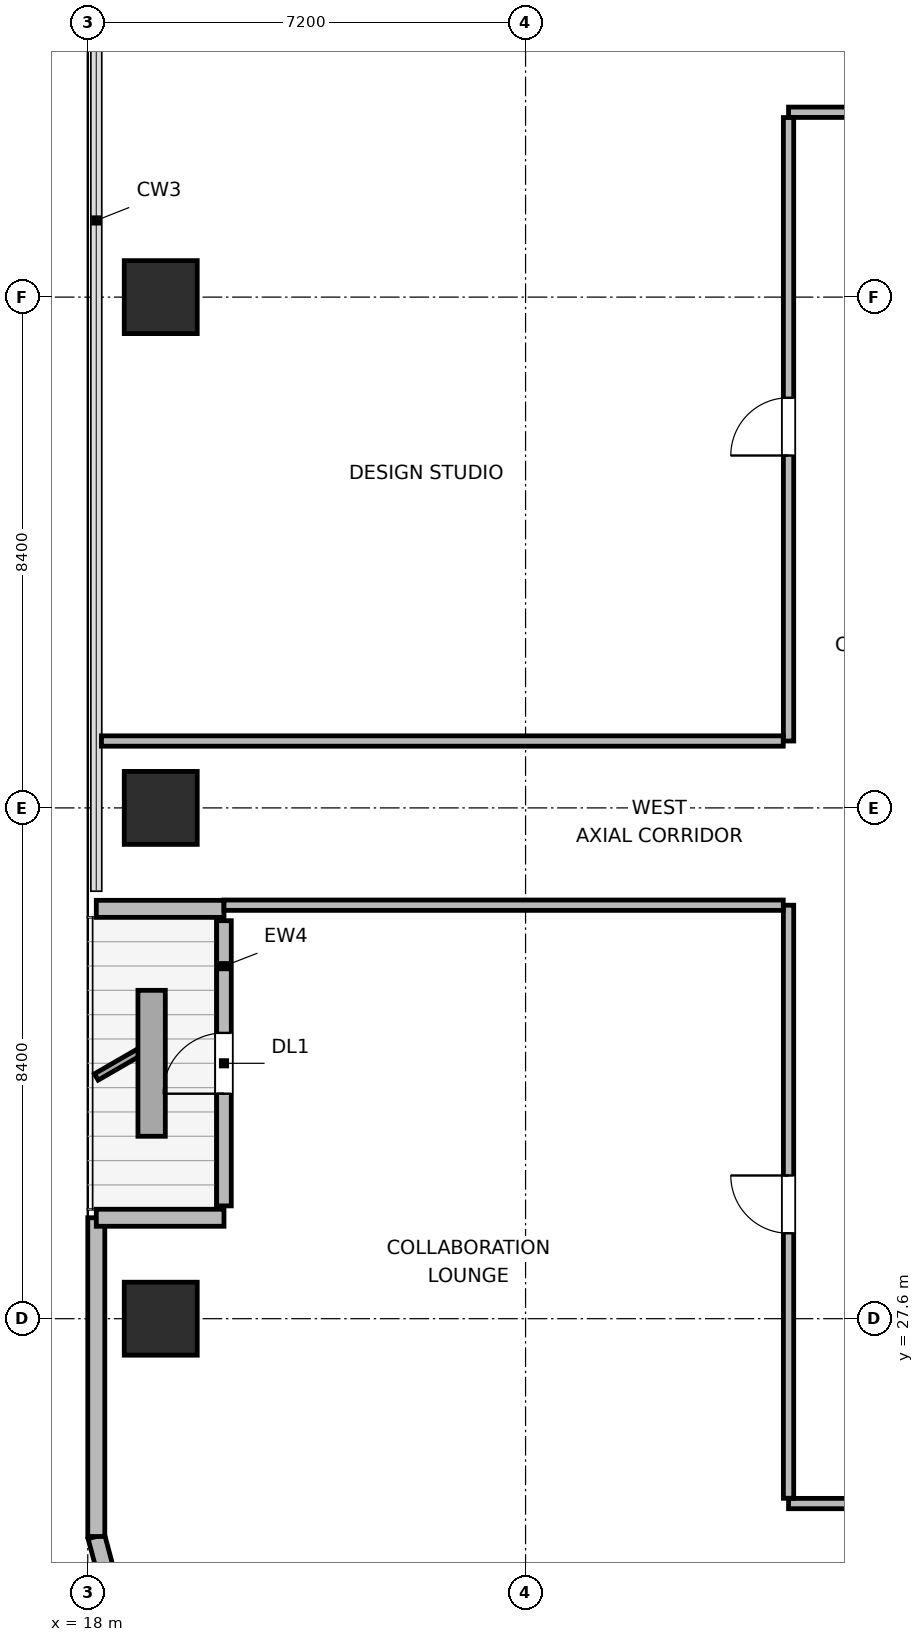
"""IFC4 building model, lengths in metres.
Left out: names, types, materials, properties, quantities, classifications, styles, units other than length and angle.
Written with IfcOpenShell. Run it as: python <this file> out.ifc"""

import sys

from ifc_helpers import new_model, si_unit, direction, frame, frame_2d, origin, origin_2d, place, context, subcontext, project, spatial, rectangle, extrude, element, fill, save


model = new_model("IFC4")
c1 = context("Model", 3, precision=1e-05, world=origin(), true_north=direction((0.0, 1.0)))
c2 = subcontext(c1, "Body", "Model", "MODEL_VIEW")
j1 = project(units=[si_unit("LENGTHUNIT", "METRE"), si_unit("PLANEANGLEUNIT", "RADIAN")], contexts=[c1])
p1 = place(None, origin())
s1 = spatial("IfcSite", under=j1, at=p1, CompositionType="ELEMENT")
p2 = place(p1, origin())
s2 = spatial("IfcBuilding", under=s1, at=p2, CompositionType="ELEMENT")
p3 = place(p2, frame((0.0, 0.0, 174.0)))
s3 = spatial("IfcBuildingStorey", under=s2, at=p3, CompositionType="ELEMENT", Elevation=174.0)
for number, where, z_axis, x_axis in (
    (1, (19.2, 27.6, 0.0), (0.0, 0.0, 1.0), (1.0, 0.0, 0.0)),
    (2, (19.2, 36.0, 0.0), (0.0, 0.0, 1.0), (1.0, 0.0, 0.0)),
    (3, (19.2, 44.4, 0.0), (0.0, 0.0, 1.0), (1.0, 0.0, 0.0)),
):
    element("IfcColumn", number, at=place(p3, frame(where, z_axis=z_axis, x_axis=x_axis)), inside=s3, PredefinedType="COLUMN", context=c2, shape_type="SweptSolid", body=[
        extrude(rectangle(XDim=1.2, YDim=1.2, at=origin_2d()), origin(), (0.0, 0.0, 1.0), 3.9),
    ])
p4 = place(p3, frame((18.848, 21.373, 0.0), z_axis=(0.0, 0.0, 1.0), x_axis=(-0.258672222976, 0.9659651552, 0.0)))
e4 = element("IfcWall", 4, at=p4, inside=s3, PredefinedType="SOLIDWALL", context=c2, shape_type="SweptSolid", body=[
    extrude(rectangle(XDim=2.739, YDim=0.28, at=frame_2d((1.37, 0.0))), origin(), (0.0, 0.0, 1.0), 3.68),
])
p5 = place(p3, frame((18.14, 24.018, 0.0), z_axis=(0.0, 0.0, 1.0), x_axis=(0.0, 1.0, 0.0)))
e5 = element("IfcWall", 5, at=p5, inside=s3, PredefinedType="SOLIDWALL", context=c2, shape_type="SweptSolid", body=[
    extrude(rectangle(XDim=5.242, YDim=0.28, at=frame_2d((2.621, 0.0))), origin(), (0.0, 0.0, 1.0), 3.68),
])
p6 = place(p3, frame((18.14, 29.26, 0.0), z_axis=(0.0, 0.0, 1.0), x_axis=(1.0, 0.0, 0.0)))
e6 = element("IfcWall", 6, at=p6, inside=s3, PredefinedType="SOLIDWALL", context=c2, shape_type="SweptSolid", body=[
    extrude(rectangle(XDim=2.1, YDim=0.28, at=frame_2d((1.05, 0.0))), origin(), (0.0, 0.0, 1.0), 3.116),
])
p7 = place(p3, frame((20.24, 29.455, 0.0), z_axis=(0.0, 0.0, 1.0), x_axis=(0.0, 1.0, 0.0)))
e7 = element("IfcWall", 7, at=p7, inside=s3, PredefinedType="SOLIDWALL", context=c2, shape_type="SweptSolid", body=[
    extrude(rectangle(XDim=4.69, YDim=0.24, at=frame_2d((2.345, 0.0))), origin(), (0.0, 0.0, 1.0), 3.248),
])
p8 = place(p7, frame((1.845, 0.0, 0.0)))
e8 = element("IfcOpeningElement", 8, at=p8, cuts=e7, PredefinedType="OPENING", context=c2, shape_type="SweptSolid", body=[
    extrude(rectangle(XDim=1.0, YDim=2.02, at=frame_2d((0.5, 1.01))), frame((0.0, 0.13, 0.0), z_axis=(0.0, -1.0, 0.0), x_axis=(1.0, 0.0, 0.0)), (0.0, 0.0, 1.0), 0.26),
])
p9 = place(p3, frame((20.24, 34.34, 0.0), z_axis=(0.0, 0.0, 1.0), x_axis=(-1.0, 0.0, 0.0)))
e9 = element("IfcWall", 9, at=p9, inside=s3, PredefinedType="SOLIDWALL", context=c2, shape_type="SweptSolid", body=[
    extrude(rectangle(XDim=2.1, YDim=0.28, at=frame_2d((1.05, 0.0))), origin(), (0.0, 0.0, 1.0), 3.116),
])
p10 = place(p3, frame((29.525, 24.56, 0.0), z_axis=(0.0, 0.0, 1.0), x_axis=(1.0, 0.0, 0.0)))
e10 = element("IfcWall", 10, at=p10, inside=s3, PredefinedType="PARTITIONING", context=c2, shape_type="SweptSolid", body=[
    extrude(rectangle(XDim=34.075, YDim=0.17, at=frame_2d((17.038, 0.0))), origin(), (0.0, 0.0, 1.0), 3.68),
])
p11 = place(p10, frame((5.403, 0.0, 0.0)))
e11 = element("IfcOpeningElement", 11, at=p11, cuts=e10, PredefinedType="OPENING", context=c2, shape_type="SweptSolid", body=[
    extrude(rectangle(XDim=0.95, YDim=2.04, at=frame_2d((0.475, 1.02))), frame((0.0, 0.095, 0.0), z_axis=(0.0, -1.0, 0.0), x_axis=(1.0, 0.0, 0.0)), (0.0, 0.0, 1.0), 0.19),
])
p12 = place(p10, frame((16.56, 0.0, 0.0)))
e12 = element("IfcOpeningElement", 12, at=p12, cuts=e10, PredefinedType="OPENING", context=c2, shape_type="SweptSolid", body=[
    extrude(rectangle(XDim=0.95, YDim=2.04, at=frame_2d((0.475, 1.02))), frame((0.0, 0.095, 0.0), z_axis=(0.0, -1.0, 0.0), x_axis=(1.0, 0.0, 0.0)), (0.0, 0.0, 1.0), 0.19),
])
p13 = place(p10, frame((27.72, 0.0, 0.0)))
e13 = element("IfcOpeningElement", 13, at=p13, cuts=e10, PredefinedType="OPENING", context=c2, shape_type="SweptSolid", body=[
    extrude(rectangle(XDim=0.95, YDim=2.04, at=frame_2d((0.475, 1.02))), frame((0.0, 0.095, 0.0), z_axis=(0.0, -1.0, 0.0), x_axis=(1.0, 0.0, 0.0)), (0.0, 0.0, 1.0), 0.19),
])
p14 = place(p3, frame((29.525, 47.44, 0.0), z_axis=(0.0, 0.0, 1.0), x_axis=(1.0, 0.0, 0.0)))
e14 = element("IfcWall", 14, at=p14, inside=s3, PredefinedType="PARTITIONING", context=c2, shape_type="SweptSolid", body=[
    extrude(rectangle(XDim=34.075, YDim=0.17, at=frame_2d((17.038, 0.0))), origin(), (0.0, 0.0, 1.0), 3.68),
])
p15 = place(p14, frame((1.217, 0.0, 0.0)))
e15 = element("IfcOpeningElement", 15, at=p15, cuts=e14, PredefinedType="OPENING", context=c2, shape_type="SweptSolid", body=[
    extrude(rectangle(XDim=0.95, YDim=2.04, at=frame_2d((0.475, 1.02))), frame((0.0, 0.095, 0.0), z_axis=(0.0, -1.0, 0.0), x_axis=(1.0, 0.0, 0.0)), (0.0, 0.0, 1.0), 0.19),
])
p16 = place(p14, frame((6.37, 0.0, 0.0)))
e16 = element("IfcOpeningElement", 16, at=p16, cuts=e14, PredefinedType="OPENING", context=c2, shape_type="SweptSolid", body=[
    extrude(rectangle(XDim=0.95, YDim=2.04, at=frame_2d((0.475, 1.02))), frame((0.0, 0.095, 0.0), z_axis=(0.0, -1.0, 0.0), x_axis=(1.0, 0.0, 0.0)), (0.0, 0.0, 1.0), 0.19),
])
p17 = place(p14, frame((12.01, 0.0, 0.0)))
e17 = element("IfcOpeningElement", 17, at=p17, cuts=e14, PredefinedType="OPENING", context=c2, shape_type="SweptSolid", body=[
    extrude(rectangle(XDim=0.95, YDim=2.04, at=frame_2d((0.475, 1.02))), frame((0.0, 0.095, 0.0), z_axis=(0.0, -1.0, 0.0), x_axis=(1.0, 0.0, 0.0)), (0.0, 0.0, 1.0), 0.19),
])
p18 = place(p14, frame((16.86, 0.0, 0.0)))
e18 = element("IfcOpeningElement", 18, at=p18, cuts=e14, PredefinedType="OPENING", context=c2, shape_type="SweptSolid", body=[
    extrude(rectangle(XDim=0.95, YDim=2.04, at=frame_2d((0.475, 1.02))), frame((0.0, 0.095, 0.0), z_axis=(0.0, -1.0, 0.0), x_axis=(1.0, 0.0, 0.0)), (0.0, 0.0, 1.0), 0.19),
])
p19 = place(p14, frame((20.965, 0.0, 0.0)))
e19 = element("IfcOpeningElement", 19, at=p19, cuts=e14, PredefinedType="OPENING", context=c2, shape_type="SweptSolid", body=[
    extrude(rectangle(XDim=0.95, YDim=2.04, at=frame_2d((0.475, 1.02))), frame((0.0, 0.095, 0.0), z_axis=(0.0, -1.0, 0.0), x_axis=(1.0, 0.0, 0.0)), (0.0, 0.0, 1.0), 0.19),
])
p20 = place(p14, frame((25.52, 0.0, 0.0)))
e20 = element("IfcOpeningElement", 20, at=p20, cuts=e14, PredefinedType="OPENING", context=c2, shape_type="SweptSolid", body=[
    extrude(rectangle(XDim=0.95, YDim=2.04, at=frame_2d((0.475, 1.02))), frame((0.0, 0.095, 0.0), z_axis=(0.0, -1.0, 0.0), x_axis=(1.0, 0.0, 0.0)), (0.0, 0.0, 1.0), 0.19),
])
p21 = place(p14, frame((31.12, 0.0, 0.0)))
e21 = element("IfcOpeningElement", 21, at=p21, cuts=e14, PredefinedType="OPENING", context=c2, shape_type="SweptSolid", body=[
    extrude(rectangle(XDim=0.95, YDim=2.04, at=frame_2d((0.475, 1.02))), frame((0.0, 0.095, 0.0), z_axis=(0.0, -1.0, 0.0), x_axis=(1.0, 0.0, 0.0)), (0.0, 0.0, 1.0), 0.19),
])
p22 = place(p3, frame((29.525, 24.647, 0.0), z_axis=(0.0, 0.0, 1.0), x_axis=(0.0, 1.0, 0.0)))
e22 = element("IfcWall", 22, at=p22, inside=s3, PredefinedType="PARTITIONING", context=c2, shape_type="SweptSolid", body=[
    extrude(rectangle(XDim=9.753, YDim=0.17, at=frame_2d((4.876, 0.0))), origin(), (0.0, 0.0, 1.0), 3.68),
])
p23 = place(p22, frame((4.358, 0.0, 0.0)))
e23 = element("IfcOpeningElement", 23, at=p23, cuts=e22, PredefinedType="OPENING", context=c2, shape_type="SweptSolid", body=[
    extrude(rectangle(XDim=0.95, YDim=2.04, at=frame_2d((0.475, 1.02))), frame((0.0, 0.095, 0.0), z_axis=(0.0, -1.0, 0.0), x_axis=(1.0, 0.0, 0.0)), (0.0, 0.0, 1.0), 0.19),
])
p24 = place(p3, frame((29.525, 37.1, 0.0), z_axis=(0.0, 0.0, 1.0), x_axis=(0.0, 1.0, 0.0)))
e24 = element("IfcWall", 24, at=p24, inside=s3, PredefinedType="PARTITIONING", context=c2, shape_type="SweptSolid", body=[
    extrude(rectangle(XDim=10.253, YDim=0.17, at=frame_2d((5.126, 0.0))), origin(), (0.0, 0.0, 1.0), 3.68),
])
p25 = place(p24, frame((4.695, 0.0, 0.0)))
e25 = element("IfcOpeningElement", 25, at=p25, cuts=e24, PredefinedType="OPENING", context=c2, shape_type="SweptSolid", body=[
    extrude(rectangle(XDim=0.95, YDim=2.04, at=frame_2d((0.475, 1.02))), frame((0.0, 0.095, 0.0), z_axis=(0.0, -1.0, 0.0), x_axis=(1.0, 0.0, 0.0)), (0.0, 0.0, 1.0), 0.19),
])
p26 = place(p3, frame((20.24, 34.4, 0.0), z_axis=(0.0, 0.0, 1.0), x_axis=(1.0, 0.0, 0.0)))
e26 = element("IfcWall", 26, at=p26, inside=s3, PredefinedType="PARTITIONING", context=c2, shape_type="SweptSolid", body=[
    extrude(rectangle(XDim=9.198, YDim=0.17, at=frame_2d((4.599, 0.0))), origin(), (0.0, 0.0, 1.0), 3.68),
])
p27 = place(p3, frame((18.225, 37.1, 0.0), z_axis=(0.0, 0.0, 1.0), x_axis=(1.0, 0.0, 0.0)))
e27 = element("IfcWall", 27, at=p27, inside=s3, PredefinedType="PARTITIONING", context=c2, shape_type="SweptSolid", body=[
    extrude(rectangle(XDim=11.213, YDim=0.17, at=frame_2d((5.606, 0.0))), origin(), (0.0, 0.0, 1.0), 3.68),
])
p28 = place(p8, origin())
e28 = element("IfcDoor", 28, at=p28, inside=s3, OperationType="SINGLE_SWING_LEFT", PredefinedType="DOOR", context=c2, shape_type="SweptSolid", body=[
    extrude(rectangle(XDim=1.0, YDim=2.02, at=frame_2d((0.5, 1.01))), frame((0.0, 0.025, 0.0), z_axis=(0.0, -1.0, 0.0), x_axis=(1.0, 0.0, 0.0)), (0.0, 0.0, 1.0), 0.05),
])
fill(e8, e28)
p29 = place(p23, origin())
e29 = element("IfcDoor", 29, at=p29, inside=s3, OperationType="SINGLE_SWING_RIGHT", PredefinedType="DOOR", context=c2, shape_type="SweptSolid", body=[
    extrude(rectangle(XDim=0.95, YDim=2.04, at=frame_2d((0.475, 1.02))), frame((0.0, 0.025, 0.0), z_axis=(0.0, -1.0, 0.0), x_axis=(1.0, 0.0, 0.0)), (0.0, 0.0, 1.0), 0.05),
])
fill(e23, e29)
p30 = place(p25, origin())
e30 = element("IfcDoor", 30, at=p30, inside=s3, OperationType="SINGLE_SWING_LEFT", PredefinedType="DOOR", context=c2, shape_type="SweptSolid", body=[
    extrude(rectangle(XDim=0.95, YDim=2.04, at=frame_2d((0.475, 1.02))), frame((0.0, 0.025, 0.0), z_axis=(0.0, -1.0, 0.0), x_axis=(1.0, 0.0, 0.0)), (0.0, 0.0, 1.0), 0.05),
])
fill(e25, e30)
save(model, sys.argv[1])
